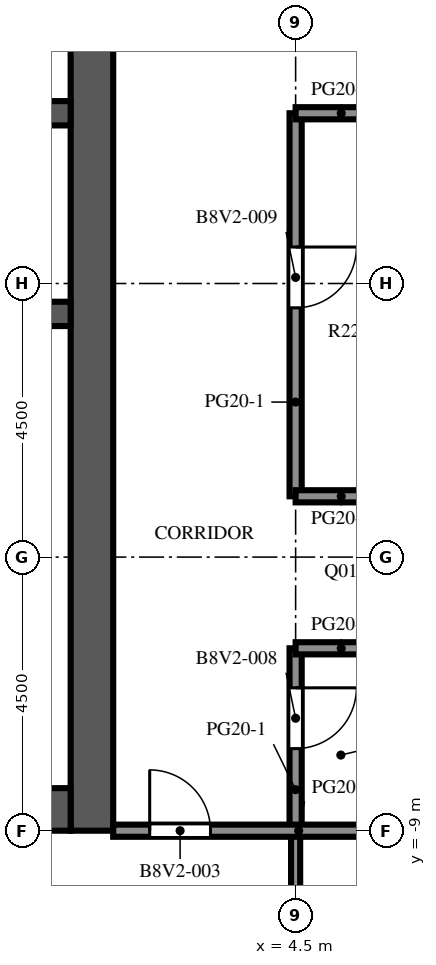
"""IFC4 building model, lengths in metres.
Left out: names, types, materials, properties, quantities, classifications, styles, units other than length and angle.
Written with IfcOpenShell. Run it as: python <this file> out.ifc"""

import sys

from ifc_helpers import new_model, si_unit, direction, frame, frame_2d, origin, place, context, subcontext, project, spatial, rectangle, extrude, element, fill, save


model = new_model("IFC4")
c1 = context("Model", 3, precision=1e-05, world=origin(), true_north=direction((0.0, 1.0)))
c2 = subcontext(c1, "Body", "Model", "MODEL_VIEW")
j1 = project(units=[si_unit("LENGTHUNIT", "METRE"), si_unit("PLANEANGLEUNIT", "RADIAN")], contexts=[c1])
p1 = place(None, origin())
s1 = spatial("IfcSite", under=j1, at=p1, CompositionType="ELEMENT")
p2 = place(p1, origin())
s2 = spatial("IfcBuilding", under=s1, at=p2, CompositionType="ELEMENT")
p3 = place(p2, frame((0.0, 0.0, 282.7)))
s3 = spatial("IfcBuildingStorey", under=s2, at=p3, CompositionType="ELEMENT", Elevation=282.7)
p4 = place(p3, frame((1.15, -9.0, 0.0), z_axis=(0.0, 0.0, 1.0), x_axis=(0.0, 1.0, 0.0)))
e1 = element("IfcWall", 1, at=p4, inside=s3, PredefinedType="SHEAR", context=c2, shape_type="SweptSolid", body=[
    extrude(rectangle(XDim=27.5, YDim=0.7, at=frame_2d((13.75, 0.0))), origin(), (0.0, 0.0, 1.0), 4.1),
])
p5 = place(p4, frame((12.55, 0.0, 0.0)))
e2 = element("IfcOpeningElement", 2, at=p5, cuts=e1, PredefinedType="OPENING", context=c2, shape_type="SweptSolid", body=[
    extrude(rectangle(XDim=2.4, YDim=2.4, at=frame_2d((1.2, 1.2))), frame((0.0, 0.36, 0.0), z_axis=(0.0, -1.0, 0.0), x_axis=(1.0, 0.0, 0.0)), (0.0, 0.0, 1.0), 0.72),
])
p6 = place(p4, frame((3.9, 0.0, 0.0)))
e3 = element("IfcOpeningElement", 3, at=p6, cuts=e1, PredefinedType="OPENING", context=c2, shape_type="SweptSolid", body=[
    extrude(rectangle(XDim=1.2, YDim=2.1, at=frame_2d((0.6, 1.05))), frame((0.0, 0.36, 0.0), z_axis=(0.0, -1.0, 0.0), x_axis=(1.0, 0.0, 0.0)), (0.0, 0.0, 1.0), 0.72),
])
p7 = place(p4, frame((22.4, 0.0, 0.0)))
e4 = element("IfcOpeningElement", 4, at=p7, cuts=e1, PredefinedType="OPENING", context=c2, shape_type="SweptSolid", body=[
    extrude(rectangle(XDim=1.2, YDim=2.1, at=frame_2d((0.6, 1.05))), frame((0.0, 0.36, 0.0), z_axis=(0.0, -1.0, 0.0), x_axis=(1.0, 0.0, 0.0)), (0.0, 0.0, 1.0), 0.72),
])
p8 = place(p3, frame((-9.8, -8.65, 0.0), z_axis=(0.0, 0.0, 1.0), x_axis=(1.0, 0.0, 0.0)))
e5 = element("IfcWall", 5, at=p8, inside=s3, PredefinedType="SHEAR", context=c2, shape_type="SweptSolid", body=[
    extrude(rectangle(XDim=10.6, YDim=0.7, at=frame_2d((5.3, 0.0))), origin(), (0.0, 0.0, 1.0), 4.1),
])
p9 = place(p3, frame((-9.8, -0.5, 0.0), z_axis=(0.0, 0.0, 1.0), x_axis=(1.0, 0.0, 0.0)))
e6 = element("IfcWall", 6, at=p9, inside=s3, PredefinedType="SHEAR", context=c2, shape_type="SweptSolid", body=[
    extrude(rectangle(XDim=10.6, YDim=0.4, at=frame_2d((5.3, 0.0))), origin(), (0.0, 0.0, 1.0), 4.1),
])
p10 = place(p3, frame((-9.8, 2.8, 0.0), z_axis=(0.0, 0.0, 1.0), x_axis=(1.0, 0.0, 0.0)))
e7 = element("IfcWall", 7, at=p10, inside=s3, PredefinedType="SHEAR", context=c2, shape_type="SweptSolid", body=[
    extrude(rectangle(XDim=10.6, YDim=0.4, at=frame_2d((5.3, 0.0))), origin(), (0.0, 0.0, 1.0), 4.1),
])
p11 = place(p10, frame((0.688, 0.0, 0.0)))
e8 = element("IfcOpeningElement", 8, at=p11, cuts=e7, PredefinedType="OPENING", context=c2, shape_type="SweptSolid", body=[
    extrude(rectangle(XDim=1.1, YDim=2.1, at=frame_2d((0.55, 1.05))), frame((0.0, 0.21, 0.0), z_axis=(0.0, -1.0, 0.0), x_axis=(1.0, 0.0, 0.0)), (0.0, 0.0, 1.0), 0.42),
])
p12 = place(p10, frame((3.438, 0.0, 0.0)))
e9 = element("IfcOpeningElement", 9, at=p12, cuts=e7, PredefinedType="OPENING", context=c2, shape_type="SweptSolid", body=[
    extrude(rectangle(XDim=1.1, YDim=2.1, at=frame_2d((0.55, 1.05))), frame((0.0, 0.21, 0.0), z_axis=(0.0, -1.0, 0.0), x_axis=(1.0, 0.0, 0.0)), (0.0, 0.0, 1.0), 0.42),
])
p13 = place(p10, frame((6.113, 0.0, 0.0)))
e10 = element("IfcOpeningElement", 10, at=p13, cuts=e7, PredefinedType="OPENING", context=c2, shape_type="SweptSolid", body=[
    extrude(rectangle(XDim=1.0, YDim=2.1, at=frame_2d((0.5, 1.05))), frame((0.0, 0.21, 0.0), z_axis=(0.0, -1.0, 0.0), x_axis=(1.0, 0.0, 0.0)), (0.0, 0.0, 1.0), 0.42),
])
p14 = place(p10, frame((8.863, 0.0, 0.0)))
e11 = element("IfcOpeningElement", 11, at=p14, cuts=e7, PredefinedType="OPENING", context=c2, shape_type="SweptSolid", body=[
    extrude(rectangle(XDim=1.0, YDim=2.1, at=frame_2d((0.5, 1.05))), frame((0.0, 0.21, 0.0), z_axis=(0.0, -1.0, 0.0), x_axis=(1.0, 0.0, 0.0)), (0.0, 0.0, 1.0), 0.42),
])
p15 = place(p3, frame((4.5, -9.0, 0.0), z_axis=(0.0, 0.0, 1.0), x_axis=(0.0, -1.0, 0.0)))
e12 = element("IfcWall", 12, at=p15, inside=s3, PredefinedType="PARTITIONING", context=c2, shape_type="SweptSolid", body=[
    extrude(rectangle(XDim=8.6, YDim=0.15, at=frame_2d((4.3, 0.0))), origin(), (0.0, 0.0, 1.0), 3.65),
])
p16 = place(p15, frame((2.9, 0.0, 0.0)))
e13 = element("IfcOpeningElement", 13, at=p16, cuts=e12, PredefinedType="OPENING", context=c2, shape_type="SweptSolid", body=[
    extrude(rectangle(XDim=1.0, YDim=2.1, at=frame_2d((0.5, 1.05))), frame((0.0, 0.085, 0.0), z_axis=(0.0, -1.0, 0.0), x_axis=(1.0, 0.0, 0.0)), (0.0, 0.0, 1.0), 0.17),
])
p17 = place(p3, frame((4.5, -6.0, 0.0), z_axis=(0.0, 0.0, 1.0), x_axis=(0.0, -1.0, 0.0)))
e14 = element("IfcWall", 14, at=p17, inside=s3, PredefinedType="PARTITIONING", context=c2, shape_type="SweptSolid", body=[
    extrude(rectangle(XDim=3.0, YDim=0.2, at=frame_2d((1.5, 0.0))), origin(), (0.0, 0.0, 1.0), 3.65),
])
p18 = place(p17, frame((0.65, 0.0, 0.0)))
e15 = element("IfcOpeningElement", 15, at=p18, cuts=e14, PredefinedType="OPENING", context=c2, shape_type="SweptSolid", body=[
    extrude(rectangle(XDim=1.0, YDim=2.1, at=frame_2d((0.5, 1.05))), frame((0.0, 0.11, 0.0), z_axis=(0.0, -1.0, 0.0), x_axis=(1.0, 0.0, 0.0)), (0.0, 0.0, 1.0), 0.22),
])
p19 = place(p3, frame((4.5, 2.8, 0.0), z_axis=(0.0, 0.0, 1.0), x_axis=(0.0, -1.0, 0.0)))
e16 = element("IfcWall", 16, at=p19, inside=s3, PredefinedType="PARTITIONING", context=c2, shape_type="SweptSolid", body=[
    extrude(rectangle(XDim=6.3, YDim=0.2, at=frame_2d((3.15, 0.0))), origin(), (0.0, 0.0, 1.0), 3.65),
])
p20 = place(p19, frame((2.2, 0.0, 0.0)))
e17 = element("IfcOpeningElement", 17, at=p20, cuts=e16, PredefinedType="OPENING", context=c2, shape_type="SweptSolid", body=[
    extrude(rectangle(XDim=1.0, YDim=2.1, at=frame_2d((0.5, 1.05))), frame((0.0, 0.11, 0.0), z_axis=(0.0, -1.0, 0.0), x_axis=(1.0, 0.0, 0.0)), (0.0, 0.0, 1.0), 0.22),
])
p21 = place(p3, frame((6.0, -9.0, 0.0), z_axis=(0.0, 0.0, 1.0), x_axis=(-1.0, 0.0, 0.0)))
e18 = element("IfcWall", 18, at=p21, inside=s3, PredefinedType="PARTITIONING", context=c2, shape_type="SweptSolid", body=[
    extrude(rectangle(XDim=4.5, YDim=0.2, at=frame_2d((2.25, 0.0))), origin(), (0.0, 0.0, 1.0), 3.65),
])
p22 = place(p21, frame((2.9, 0.0, 0.0)))
e19 = element("IfcOpeningElement", 19, at=p22, cuts=e18, PredefinedType="OPENING", context=c2, shape_type="SweptSolid", body=[
    extrude(rectangle(XDim=1.0, YDim=2.1, at=frame_2d((0.5, 1.05))), frame((0.0, 0.11, 0.0), z_axis=(0.0, -1.0, 0.0), x_axis=(1.0, 0.0, 0.0)), (0.0, 0.0, 1.0), 0.22),
])
for number, where, z_axis, x_axis in (
    (20, (4.5, -6.0, 0.0), (0.0, 0.0, 1.0), (1.0, 0.0, 0.0)),
    (21, (4.5, -3.5, 0.0), (0.0, 0.0, 1.0), (1.0, 0.0, 0.0)),
    (22, (4.5, 2.8, 0.0), (0.0, 0.0, 1.0), (1.0, 0.0, 0.0)),
):
    element("IfcWall", number, at=place(p3, frame(where, z_axis=z_axis, x_axis=x_axis)), inside=s3, PredefinedType="PARTITIONING", context=c2, shape_type="SweptSolid", body=[
        extrude(rectangle(XDim=1.5, YDim=0.2, at=frame_2d((0.75, 0.0))), origin(), (0.0, 0.0, 1.0), 3.65),
    ])
p23 = place(p5, origin())
e23 = element("IfcDoor", 23, at=p23, inside=s3, OperationType="DOUBLE_DOOR_DOUBLE_SWING", PredefinedType="DOOR", context=c2, shape_type="SweptSolid", body=[
    extrude(rectangle(XDim=2.4, YDim=2.4, at=frame_2d((1.2, 1.2))), frame((0.0, 0.025, 0.0), z_axis=(0.0, -1.0, 0.0), x_axis=(1.0, 0.0, 0.0)), (0.0, 0.0, 1.0), 0.05),
])
fill(e2, e23)
p24 = place(p6, origin())
e24 = element("IfcDoor", 24, at=p24, inside=s3, OperationType="SINGLE_SWING_LEFT", PredefinedType="DOOR", context=c2, shape_type="SweptSolid", body=[
    extrude(rectangle(XDim=1.2, YDim=2.1, at=frame_2d((0.6, 1.05))), frame((0.0, 0.325, 0.0), z_axis=(0.0, -1.0, 0.0), x_axis=(1.0, 0.0, 0.0)), (0.0, 0.0, 1.0), 0.05),
])
fill(e3, e24)
p25 = place(p22, origin())
e25 = element("IfcDoor", 25, at=p25, inside=s3, OperationType="SINGLE_SWING_RIGHT", PredefinedType="DOOR", context=c2, shape_type="SweptSolid", body=[
    extrude(rectangle(XDim=1.0, YDim=2.1, at=frame_2d((0.5, 1.05))), frame((0.0, 0.025, 0.0), z_axis=(0.0, -1.0, 0.0), x_axis=(1.0, 0.0, 0.0)), (0.0, 0.0, 1.0), 0.05),
])
fill(e19, e25)
p26 = place(p18, origin())
e26 = element("IfcDoor", 26, at=p26, inside=s3, OperationType="SINGLE_SWING_LEFT", PredefinedType="DOOR", context=c2, shape_type="SweptSolid", body=[
    extrude(rectangle(XDim=1.0, YDim=2.1, at=frame_2d((0.5, 1.05))), frame((0.0, 0.025, 0.0), z_axis=(0.0, -1.0, 0.0), x_axis=(1.0, 0.0, 0.0)), (0.0, 0.0, 1.0), 0.05),
])
fill(e15, e26)
p27 = place(p20, origin())
e27 = element("IfcDoor", 27, at=p27, inside=s3, OperationType="SINGLE_SWING_LEFT", PredefinedType="DOOR", context=c2, shape_type="SweptSolid", body=[
    extrude(rectangle(XDim=1.0, YDim=2.1, at=frame_2d((0.5, 1.05))), frame((0.0, 0.025, 0.0), z_axis=(0.0, -1.0, 0.0), x_axis=(1.0, 0.0, 0.0)), (0.0, 0.0, 1.0), 0.05),
])
fill(e17, e27)
save(model, sys.argv[1])
